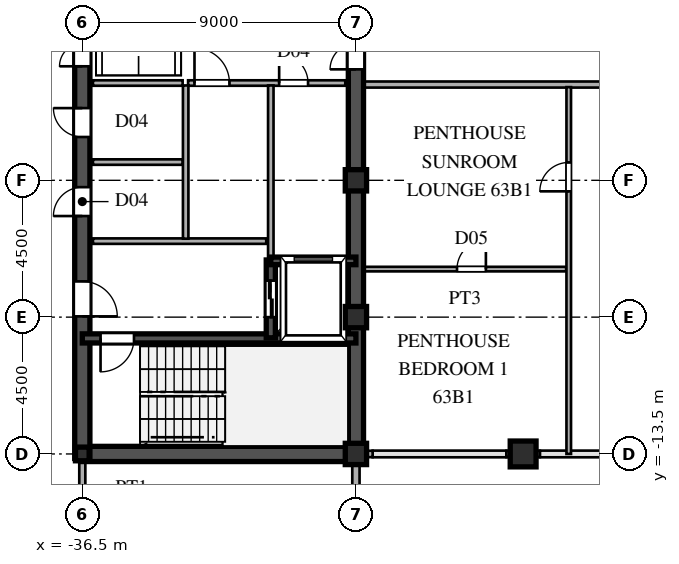
"""IFC4 building model, lengths in metres.
Left out: names, types, materials, properties, quantities, classifications, styles, units other than length and angle.
Written with IfcOpenShell. Run it as: python <this file> out.ifc"""

import sys

from ifc_helpers import new_model, si_unit, direction, frame, frame_2d, origin, origin_2d, place, context, subcontext, project, spatial, rectangle, hollow_rectangle, i_section, extrude, source, transform, mapped, element, fill, save


model = new_model("IFC4")
c1 = context("Model", 3, precision=1e-05, world=origin(), true_north=direction((0.0, 1.0)))
c2 = subcontext(c1, "Body", "Model", "MODEL_VIEW")
j1 = project(units=[si_unit("LENGTHUNIT", "METRE"), si_unit("PLANEANGLEUNIT", "RADIAN")], contexts=[c1])
p1 = place(None, origin())
s1 = spatial("IfcSite", under=j1, at=p1, CompositionType="ELEMENT")
p2 = place(p1, origin())
s2 = spatial("IfcBuilding", under=s1, at=p2, CompositionType="ELEMENT")
p3 = place(p2, frame((0.0, 0.0, 239.4)))
s3 = spatial("IfcBuildingStorey", under=s2, at=p3, CompositionType="ELEMENT", Elevation=239.4)
m1 = source(origin(), c2, "Body", "SweptSolid", [
    extrude(hollow_rectangle(XDim=0.7, YDim=0.7, WallThickness=0.03, at=origin_2d()), origin(), (0.0, 0.0, 1.0), 3.75),
])
for number, where, z_axis, x_axis in (
    (1, (-27.5, -13.5, 0.0), (0.0, 0.0, 1.0), (1.0, 0.0, 0.0)),
    (2, (-27.5, -9.0, 0.0), (0.0, 0.0, 1.0), (1.0, 0.0, 0.0)),
    (3, (-27.5, -4.5, 0.0), (0.0, 0.0, 1.0), (1.0, 0.0, 0.0)),
):
    element("IfcColumn", number, at=place(p3, frame(where, z_axis=z_axis, x_axis=x_axis)), inside=s3, PredefinedType="COLUMN", context=c2, shape_type="MappedRepresentation", body=[
        mapped(m1, transform((0.0, 0.0, 0.0), scale=1.0)),
    ])
m2 = source(origin(), c2, "Body", "SweptSolid", [
    extrude(i_section(OverallWidth=0.45, OverallDepth=0.45, WebThickness=0.016, FlangeThickness=0.025, at=origin_2d()), origin(), (0.0, 0.0, 1.0), 3.75),
])
p4 = place(p3, frame((-36.5, -13.5, 0.0), z_axis=(0.0, 0.0, 1.0), x_axis=(1.0, 0.0, 0.0)))
e4 = element("IfcColumn", 4, at=p4, inside=s3, PredefinedType="COLUMN", context=c2, shape_type="MappedRepresentation", body=[
    mapped(m2, transform((0.0, 0.0, 0.0), scale=1.0)),
])
m3 = source(origin(), c2, "Body", "SweptSolid", [
    extrude(hollow_rectangle(XDim=0.85, YDim=0.85, WallThickness=0.036, at=origin_2d()), origin(), (0.0, 0.0, 1.0), 3.75),
])
p5 = place(p3, frame((-22.0, -13.5, 0.0), z_axis=(0.0, 0.0, 1.0), x_axis=(1.0, 0.0, 0.0)))
e5 = element("IfcColumn", 5, at=p5, inside=s3, PredefinedType="COLUMN", context=c2, shape_type="MappedRepresentation", body=[
    mapped(m3, transform((0.0, 0.0, 0.0), scale=1.0)),
])
p6 = place(p3, frame((-27.5, -15.98, 0.0), z_axis=(0.0, 0.0, 1.0), x_axis=(0.0, 1.0, 0.0)))
e6 = element("IfcWall", 6, at=p6, inside=s3, PredefinedType="SOLIDWALL", context=c2, shape_type="SweptSolid", body=[
    extrude(rectangle(XDim=1.605, YDim=0.24, at=frame_2d((0.803, 0.0))), origin(), (0.0, 0.0, 1.0), 3.53),
])
p7 = place(p3, frame((-27.5, -14.375, 0.0), z_axis=(0.0, 0.0, 1.0), x_axis=(0.0, 1.0, 0.0)))
e7 = element("IfcWall", 7, at=p7, inside=s3, PredefinedType="SOLIDWALL", context=c2, shape_type="SweptSolid", body=[
    extrude(rectangle(XDim=0.62, YDim=0.24, at=frame_2d((0.31, 0.0))), origin(), (0.0, 0.0, 1.0), 3.03),
])
p8 = place(p3, frame((-27.49, -13.5, 0.0), z_axis=(0.0, 0.0, 1.0), x_axis=(1.0, 0.0, 0.0)))
e8 = element("IfcWall", 8, at=p8, inside=s3, PredefinedType="SOLIDWALL", context=c2, shape_type="SweptSolid", body=[
    extrude(rectangle(XDim=0.54, YDim=0.21, at=frame_2d((0.27, 0.0))), origin(), (0.0, 0.0, 1.0), 3.03),
])
p9 = place(p3, frame((-22.55, -13.5, 0.0), z_axis=(0.0, 0.0, 1.0), x_axis=(1.0, 0.0, 0.0)))
e9 = element("IfcWall", 9, at=p9, inside=s3, PredefinedType="SOLIDWALL", context=c2, shape_type="SweptSolid", body=[
    extrude(rectangle(XDim=1.1, YDim=0.21, at=frame_2d((0.55, 0.0))), origin(), (0.0, 0.0, 1.0), 3.03),
])
p10 = place(p3, frame((-27.5, -13.5, 0.0), z_axis=(0.0, 0.0, 1.0), x_axis=(0.0, 1.0, 0.0)))
e10 = element("IfcWall", 10, at=p10, inside=s3, PredefinedType="SHEAR", context=c2, shape_type="SweptSolid", body=[
    extrude(rectangle(XDim=12.2, YDim=0.5, at=frame_2d((6.1, 0.0))), origin(), (0.0, 0.0, 1.0), 3.53),
])
p11 = place(p3, frame((-27.5, -1.3, 0.0), z_axis=(0.0, 0.0, 1.0), x_axis=(0.0, 1.0, 0.0)))
e11 = element("IfcWall", 11, at=p11, inside=s3, PredefinedType="SHEAR", context=c2, shape_type="SweptSolid", body=[
    extrude(rectangle(XDim=2.6, YDim=0.5, at=frame_2d((1.3, 0.0))), origin(), (0.0, 0.0, 1.0), 3.53),
])
p12 = place(p11, frame((0.45, 0.0, 0.0)))
e12 = element("IfcOpeningElement", 12, at=p12, cuts=e11, PredefinedType="OPENING", context=c2, shape_type="SweptSolid", body=[
    extrude(rectangle(XDim=1.7, YDim=2.35, at=frame_2d((0.85, 1.175))), frame((0.0, 0.26, 0.0), z_axis=(0.0, -1.0, 0.0), x_axis=(1.0, 0.0, 0.0)), (0.0, 0.0, 1.0), 0.52),
])
p13 = place(p3, frame((-36.5, -13.5, 0.0), z_axis=(0.0, 0.0, 1.0), x_axis=(1.0, 0.0, 0.0)))
e13 = element("IfcWall", 13, at=p13, inside=s3, PredefinedType="SHEAR", context=c2, shape_type="SweptSolid", body=[
    extrude(rectangle(XDim=9.0, YDim=0.5, at=frame_2d((4.5, 0.0))), origin(), (0.0, 0.0, 1.0), 3.53),
])
p14 = place(p3, frame((-36.5, -13.65, 0.0), z_axis=(0.0, 0.0, 1.0), x_axis=(0.0, 1.0, 0.0)))
e14 = element("IfcWall", 14, at=p14, inside=s3, PredefinedType="SHEAR", context=c2, shape_type="SweptSolid", body=[
    extrude(rectangle(XDim=7.15, YDim=0.5, at=frame_2d((3.575, 0.0))), origin(), (0.0, 0.0, 1.0), 3.53),
])
p15 = place(p14, frame((4.675, 0.0, 0.0)))
e15 = element("IfcOpeningElement", 15, at=p15, cuts=e14, PredefinedType="OPENING", context=c2, shape_type="SweptSolid", body=[
    extrude(rectangle(XDim=1.15, YDim=2.2, at=frame_2d((0.575, 1.1))), frame((0.0, 0.26, 0.0), z_axis=(0.0, -1.0, 0.0), x_axis=(1.0, 0.0, 0.0)), (0.0, 0.0, 1.0), 0.52),
])
p16 = place(p3, frame((-36.5, -1.3, 0.0), z_axis=(0.0, 0.0, 1.0), x_axis=(0.0, 1.0, 0.0)))
e16 = element("IfcWall", 16, at=p16, inside=s3, PredefinedType="SHEAR", context=c2, shape_type="SweptSolid", body=[
    extrude(rectangle(XDim=2.6, YDim=0.5, at=frame_2d((1.3, 0.0))), origin(), (0.0, 0.0, 1.0), 3.53),
])
p17 = place(p16, frame((0.55, 0.0, 0.0)))
e17 = element("IfcOpeningElement", 17, at=p17, cuts=e16, PredefinedType="OPENING", context=c2, shape_type="SweptSolid", body=[
    extrude(rectangle(XDim=1.5, YDim=2.3, at=frame_2d((0.75, 1.15))), frame((0.0, 0.26, 0.0), z_axis=(0.0, -1.0, 0.0), x_axis=(1.0, 0.0, 0.0)), (0.0, 0.0, 1.0), 0.52),
])
p18 = place(p3, frame((-36.5, -6.5, 0.0), z_axis=(0.0, 0.0, 1.0), x_axis=(0.0, 1.0, 0.0)))
e18 = element("IfcWall", 18, at=p18, inside=s3, PredefinedType="SHEAR", context=c2, shape_type="SweptSolid", body=[
    extrude(rectangle(XDim=2.6, YDim=0.5, at=frame_2d((1.3, 0.0))), origin(), (0.0, 0.0, 1.0), 3.53),
])
p19 = place(p18, frame((0.825, 0.0, 0.0)))
e19 = element("IfcOpeningElement", 19, at=p19, cuts=e18, PredefinedType="OPENING", context=c2, shape_type="SweptSolid", body=[
    extrude(rectangle(XDim=0.95, YDim=2.15, at=frame_2d((0.475, 1.075))), frame((0.0, 0.26, 0.0), z_axis=(0.0, -1.0, 0.0), x_axis=(1.0, 0.0, 0.0)), (0.0, 0.0, 1.0), 0.52),
])
p20 = place(p3, frame((-36.5, -3.9, 0.0), z_axis=(0.0, 0.0, 1.0), x_axis=(0.0, 1.0, 0.0)))
e20 = element("IfcWall", 20, at=p20, inside=s3, PredefinedType="SHEAR", context=c2, shape_type="SweptSolid", body=[
    extrude(rectangle(XDim=2.6, YDim=0.5, at=frame_2d((1.3, 0.0))), origin(), (0.0, 0.0, 1.0), 3.53),
])
p21 = place(p20, frame((0.825, 0.0, 0.0)))
e21 = element("IfcOpeningElement", 21, at=p21, cuts=e20, PredefinedType="OPENING", context=c2, shape_type="SweptSolid", body=[
    extrude(rectangle(XDim=0.95, YDim=2.15, at=frame_2d((0.475, 1.075))), frame((0.0, 0.26, 0.0), z_axis=(0.0, -1.0, 0.0), x_axis=(1.0, 0.0, 0.0)), (0.0, 0.0, 1.0), 0.52),
])
p22 = place(p3, frame((-36.5, -9.7, 0.0), z_axis=(0.0, 0.0, 1.0), x_axis=(1.0, 0.0, 0.0)))
e22 = element("IfcWall", 22, at=p22, inside=s3, PredefinedType="SHEAR", context=c2, shape_type="SweptSolid", body=[
    extrude(rectangle(XDim=9.0, YDim=0.3, at=frame_2d((4.5, 0.0))), origin(), (0.0, 0.0, 1.0), 3.53),
])
p23 = place(p22, frame((0.6, 0.0, 0.0)))
e23 = element("IfcOpeningElement", 23, at=p23, cuts=e22, PredefinedType="OPENING", context=c2, shape_type="SweptSolid", body=[
    extrude(rectangle(XDim=1.1, YDim=2.2, at=frame_2d((0.55, 1.1))), frame((0.0, 0.16, 0.0), z_axis=(0.0, -1.0, 0.0), x_axis=(1.0, 0.0, 0.0)), (0.0, 0.0, 1.0), 0.32),
])
p24 = place(p3, frame((-30.3, -7.15, 0.0), z_axis=(0.0, 0.0, 1.0), x_axis=(1.0, 0.0, 0.0)))
e24 = element("IfcWall", 24, at=p24, inside=s3, PredefinedType="SHEAR", context=c2, shape_type="SweptSolid", body=[
    extrude(rectangle(XDim=2.8, YDim=0.25, at=frame_2d((1.4, 0.0))), origin(), (0.0, 0.0, 1.0), 3.53),
])
p25 = place(p3, frame((-30.3, -9.68, 0.0), z_axis=(0.0, 0.0, 1.0), x_axis=(0.0, 1.0, 0.0)))
e25 = element("IfcWall", 25, at=p25, inside=s3, PredefinedType="SHEAR", context=c2, shape_type="SweptSolid", body=[
    extrude(rectangle(XDim=2.56, YDim=0.3, at=frame_2d((1.28, 0.0))), origin(), (0.0, 0.0, 1.0), 3.53),
])
p26 = place(p25, frame((0.68, 0.0, 0.0)))
e26 = element("IfcOpeningElement", 26, at=p26, cuts=e25, PredefinedType="OPENING", context=c2, shape_type="SweptSolid", body=[
    extrude(rectangle(XDim=1.2, YDim=2.25, at=frame_2d((0.6, 1.125))), frame((0.0, 0.16, 0.0), z_axis=(0.0, -1.0, 0.0), x_axis=(1.0, 0.0, 0.0)), (0.0, 0.0, 1.0), 0.32),
])
p27 = place(p3, frame((-36.15, -6.5, 0.0), z_axis=(0.0, 0.0, 1.0), x_axis=(1.0, 0.0, 0.0)))
e27 = element("IfcWall", 27, at=p27, inside=s3, PredefinedType="PARTITIONING", context=c2, shape_type="SweptSolid", body=[
    extrude(rectangle(XDim=5.7, YDim=0.18, at=frame_2d((2.85, 0.0))), origin(), (0.0, 0.0, 1.0), 3.53),
])
p28 = place(p3, frame((-33.1, -6.42, 0.0), z_axis=(0.0, 0.0, 1.0), x_axis=(0.0, 1.0, 0.0)))
e28 = element("IfcWall", 28, at=p28, inside=s3, PredefinedType="PARTITIONING", context=c2, shape_type="SweptSolid", body=[
    extrude(rectangle(XDim=5.04, YDim=0.18, at=frame_2d((2.52, 0.0))), origin(), (0.0, 0.0, 1.0), 3.53),
])
p29 = place(p3, frame((-30.3, -1.3, 0.0), z_axis=(0.0, 0.0, 1.0), x_axis=(1.0, 0.0, 0.0)))
e29 = element("IfcWall", 29, at=p29, inside=s3, PredefinedType="PARTITIONING", context=c2, shape_type="SweptSolid", body=[
    extrude(rectangle(XDim=2.45, YDim=0.18, at=frame_2d((1.225, 0.0))), origin(), (0.0, 0.0, 1.0), 3.53),
])
p30 = place(p29, frame((0.275, 0.0, 0.0)))
e30 = element("IfcOpeningElement", 30, at=p30, cuts=e29, PredefinedType="OPENING", context=c2, shape_type="SweptSolid", body=[
    extrude(rectangle(XDim=0.95, YDim=2.15, at=frame_2d((0.475, 1.075))), frame((0.0, 0.1, 0.0), z_axis=(0.0, -1.0, 0.0), x_axis=(1.0, 0.0, 0.0)), (0.0, 0.0, 1.0), 0.2),
])
p31 = place(p3, frame((-33.02, -1.3, 0.0), z_axis=(0.0, 0.0, 1.0), x_axis=(1.0, 0.0, 0.0)))
e31 = element("IfcWall", 31, at=p31, inside=s3, PredefinedType="PARTITIONING", context=c2, shape_type="SweptSolid", body=[
    extrude(rectangle(XDim=2.72, YDim=0.18, at=frame_2d((1.36, 0.0))), origin(), (0.0, 0.0, 1.0), 3.53),
])
p32 = place(p31, frame((0.21, 0.0, 0.0)))
e32 = element("IfcOpeningElement", 32, at=p32, cuts=e31, PredefinedType="OPENING", context=c2, shape_type="SweptSolid", body=[
    extrude(rectangle(XDim=1.15, YDim=2.2, at=frame_2d((0.575, 1.1))), frame((0.0, 0.1, 0.0), z_axis=(0.0, -1.0, 0.0), x_axis=(1.0, 0.0, 0.0)), (0.0, 0.0, 1.0), 0.2),
])
p33 = place(p3, frame((-30.3, -7.12, 0.0), z_axis=(0.0, 0.0, 1.0), x_axis=(0.0, 1.0, 0.0)))
e33 = element("IfcWall", 33, at=p33, inside=s3, PredefinedType="PARTITIONING", context=c2, shape_type="SweptSolid", body=[
    extrude(rectangle(XDim=5.74, YDim=0.18, at=frame_2d((2.87, 0.0))), origin(), (0.0, 0.0, 1.0), 3.53),
])
for number, where, z_axis, x_axis in (
    (34, (-36.15, -1.3, 0.0), (0.0, 0.0, 1.0), (1.0, 0.0, 0.0)),
    (35, (-36.15, -3.9, 0.0), (0.0, 0.0, 1.0), (1.0, 0.0, 0.0)),
):
    element("IfcWall", number, at=place(p3, frame(where, z_axis=z_axis, x_axis=x_axis)), inside=s3, PredefinedType="PARTITIONING", context=c2, shape_type="SweptSolid", body=[
        extrude(rectangle(XDim=2.95, YDim=0.18, at=frame_2d((1.475, 0.0))), origin(), (0.0, 0.0, 1.0), 3.53),
    ])
p34 = place(p3, frame((-27.245, -7.42, 0.0), z_axis=(0.0, 0.0, 1.0), x_axis=(1.0, 0.0, 0.0)))
e36 = element("IfcWall", 36, at=p34, inside=s3, PredefinedType="PARTITIONING", context=c2, shape_type="SweptSolid", body=[
    extrude(rectangle(XDim=6.66, YDim=0.15, at=frame_2d((3.33, 0.0))), origin(), (0.0, 0.0, 1.0), 3.53),
])
p35 = place(p34, frame((3.07, 0.0, 0.0)))
e37 = element("IfcOpeningElement", 37, at=p35, cuts=e36, PredefinedType="OPENING", context=c2, shape_type="SweptSolid", body=[
    extrude(rectangle(XDim=0.95, YDim=2.15, at=frame_2d((0.475, 1.075))), frame((0.0, 0.085, 0.0), z_axis=(0.0, -1.0, 0.0), x_axis=(1.0, 0.0, 0.0)), (0.0, 0.0, 1.0), 0.17),
])
p36 = place(p3, frame((-27.245, -1.35, 0.0), z_axis=(0.0, 0.0, 1.0), x_axis=(1.0, 0.0, 0.0)))
e38 = element("IfcWall", 38, at=p36, inside=s3, PredefinedType="PARTITIONING", context=c2, shape_type="SweptSolid", body=[
    extrude(rectangle(XDim=54.49, YDim=0.2, at=frame_2d((27.245, 0.0))), origin(), (0.0, 0.0, 1.0), 3.53),
])
p37 = place(p36, frame((23.47, 0.0, 0.0)))
e39 = element("IfcOpeningElement", 39, at=p37, cuts=e38, PredefinedType="OPENING", context=c2, shape_type="SweptSolid", body=[
    extrude(rectangle(XDim=1.05, YDim=2.25, at=frame_2d((0.525, 1.125))), frame((0.0, 0.11, 0.0), z_axis=(0.0, -1.0, 0.0), x_axis=(1.0, 0.0, 0.0)), (0.0, 0.0, 1.0), 0.22),
])
p38 = place(p3, frame((-36.5, -15.515, 0.0), z_axis=(0.0, 0.0, 1.0), x_axis=(0.0, 1.0, 0.0)))
e40 = element("IfcWall", 40, at=p38, inside=s3, PredefinedType="PARTITIONING", context=c2, shape_type="SweptSolid", body=[
    extrude(rectangle(XDim=1.76, YDim=0.2, at=frame_2d((0.88, 0.0))), origin(), (0.0, 0.0, 1.0), 2.93),
])
p39 = place(p3, frame((-20.5, -13.5, 0.0), z_axis=(0.0, 0.0, 1.0), x_axis=(0.0, 1.0, 0.0)))
e41 = element("IfcWall", 41, at=p39, inside=s3, PredefinedType="PARTITIONING", context=c2, shape_type="SweptSolid", body=[
    extrude(rectangle(XDim=12.065, YDim=0.15, at=frame_2d((6.032, 0.0))), origin(), (0.0, 0.0, 1.0), 3.53),
])
p40 = place(p39, frame((8.637, 0.0, 0.0)))
e42 = element("IfcOpeningElement", 42, at=p40, cuts=e41, PredefinedType="OPENING", context=c2, shape_type="SweptSolid", body=[
    extrude(rectangle(XDim=0.95, YDim=2.15, at=frame_2d((0.475, 1.075))), frame((0.0, 0.085, 0.0), z_axis=(0.0, -1.0, 0.0), x_axis=(1.0, 0.0, 0.0)), (0.0, 0.0, 1.0), 0.17),
])
m4 = source(origin(), c2, "Body", "SweptSolid", [
    extrude(rectangle(XDim=1.7, YDim=2.35, at=frame_2d((0.85, 1.175))), frame((0.0, 0.025, 0.0), z_axis=(0.0, -1.0, 0.0), x_axis=(1.0, 0.0, 0.0)), (0.0, 0.0, 1.0), 0.05),
])
p41 = place(p12, origin())
e43 = element("IfcDoor", 43, at=p41, inside=s3, OperationType="DOUBLE_SWING_LEFT", PredefinedType="DOOR", context=c2, shape_type="MappedRepresentation", body=[
    mapped(m4, transform((0.0, 0.0, 0.0), scale=1.0)),
])
fill(e12, e43)
m5 = source(origin(), c2, "Body", "SweptSolid", [
    extrude(rectangle(XDim=1.15, YDim=2.2, at=frame_2d((0.575, 1.1))), frame((0.0, 0.025, 0.0), z_axis=(0.0, -1.0, 0.0), x_axis=(1.0, 0.0, 0.0)), (0.0, 0.0, 1.0), 0.05),
])
p42 = place(p15, frame((1.15, 0.0, 0.0), z_axis=(0.0, 0.0, 1.0), x_axis=(-1.0, 0.0, 0.0)))
e44 = element("IfcDoor", 44, at=p42, inside=s3, OperationType="SINGLE_SWING_LEFT", PredefinedType="DOOR", context=c2, shape_type="MappedRepresentation", body=[
    mapped(m5, transform((0.0, 0.0, 0.0), scale=1.0)),
])
fill(e15, e44)
m6 = source(origin(), c2, "Body", "SweptSolid", [
    extrude(rectangle(XDim=1.5, YDim=2.3, at=frame_2d((0.75, 1.15))), frame((0.0, 0.025, 0.0), z_axis=(0.0, -1.0, 0.0), x_axis=(1.0, 0.0, 0.0)), (0.0, 0.0, 1.0), 0.05),
])
p43 = place(p17, origin())
e45 = element("IfcDoor", 45, at=p43, inside=s3, OperationType="DOUBLE_SWING_LEFT", PredefinedType="DOOR", context=c2, shape_type="MappedRepresentation", body=[
    mapped(m6, transform((0.0, 0.0, 0.0), scale=1.0)),
])
fill(e17, e45)
m7 = source(origin(), c2, "Body", "SweptSolid", [
    extrude(rectangle(XDim=0.95, YDim=2.15, at=frame_2d((0.475, 1.075))), frame((0.0, 0.025, 0.0), z_axis=(0.0, -1.0, 0.0), x_axis=(1.0, 0.0, 0.0)), (0.0, 0.0, 1.0), 0.05),
])
p44 = place(p19, origin())
e46 = element("IfcDoor", 46, at=p44, inside=s3, OperationType="SINGLE_SWING_LEFT", PredefinedType="DOOR", context=c2, shape_type="MappedRepresentation", body=[
    mapped(m7, transform((0.0, 0.0, 0.0), scale=1.0)),
])
fill(e19, e46)
p45 = place(p21, origin())
e47 = element("IfcDoor", 47, at=p45, inside=s3, OperationType="SINGLE_SWING_RIGHT", PredefinedType="DOOR", context=c2, shape_type="MappedRepresentation", body=[
    mapped(m7, transform((0.0, 0.0, 0.0), scale=1.0)),
])
fill(e21, e47)
m8 = source(origin(), c2, "Body", "SweptSolid", [
    extrude(rectangle(XDim=1.1, YDim=2.2, at=frame_2d((0.55, 1.1))), frame((0.0, 0.025, 0.0), z_axis=(0.0, -1.0, 0.0), x_axis=(1.0, 0.0, 0.0)), (0.0, 0.0, 1.0), 0.05),
])
p46 = place(p23, frame((1.1, 0.0, 0.0), z_axis=(0.0, 0.0, 1.0), x_axis=(-1.0, 0.0, 0.0)))
e48 = element("IfcDoor", 48, at=p46, inside=s3, OperationType="SINGLE_SWING_LEFT", PredefinedType="DOOR", context=c2, shape_type="MappedRepresentation", body=[
    mapped(m8, transform((0.0, 0.0, 0.0), scale=1.0)),
])
fill(e23, e48)
m9 = source(origin(), c2, "Body", "SweptSolid", [
    extrude(rectangle(XDim=1.2, YDim=2.25, at=frame_2d((0.6, 1.125))), frame((0.0, 0.025, 0.0), z_axis=(0.0, -1.0, 0.0), x_axis=(1.0, 0.0, 0.0)), (0.0, 0.0, 1.0), 0.05),
])
p47 = place(p26, origin())
e49 = element("IfcDoor", 49, at=p47, inside=s3, OperationType="DOUBLE_DOOR_SLIDING", PredefinedType="DOOR", context=c2, shape_type="MappedRepresentation", body=[
    mapped(m9, transform((0.0, 0.0, 0.0), scale=1.0)),
])
fill(e26, e49)
p48 = place(p30, origin())
e50 = element("IfcDoor", 50, at=p48, inside=s3, OperationType="SINGLE_SWING_LEFT", PredefinedType="DOOR", context=c2, shape_type="MappedRepresentation", body=[
    mapped(m7, transform((0.0, 0.0, 0.0), scale=1.0)),
])
fill(e30, e50)
p49 = place(p32, origin())
e51 = element("IfcDoor", 51, at=p49, inside=s3, OperationType="SINGLE_SWING_LEFT", PredefinedType="DOOR", context=c2, shape_type="MappedRepresentation", body=[
    mapped(m5, transform((0.0, 0.0, 0.0), scale=1.0)),
])
fill(e32, e51)
m10 = source(origin(), c2, "Body", "SweptSolid", [
    extrude(rectangle(XDim=0.95, YDim=2.15, at=frame_2d((0.475, 1.075))), frame((0.0, 0.025, 0.0), z_axis=(0.0, -1.0, 0.0), x_axis=(1.0, 0.0, 0.0)), (0.0, 0.0, 1.0), 0.05),
])
p50 = place(p35, origin())
e52 = element("IfcDoor", 52, at=p50, inside=s3, OperationType="SINGLE_SWING_RIGHT", PredefinedType="DOOR", context=c2, shape_type="MappedRepresentation", body=[
    mapped(m10, transform((0.0, 0.0, 0.0), scale=1.0)),
])
fill(e37, e52)
p51 = place(p40, origin())
e53 = element("IfcDoor", 53, at=p51, inside=s3, OperationType="SINGLE_SWING_LEFT", PredefinedType="DOOR", context=c2, shape_type="MappedRepresentation", body=[
    mapped(m10, transform((0.0, 0.0, 0.0), scale=1.0)),
])
fill(e42, e53)
save(model, sys.argv[1])
